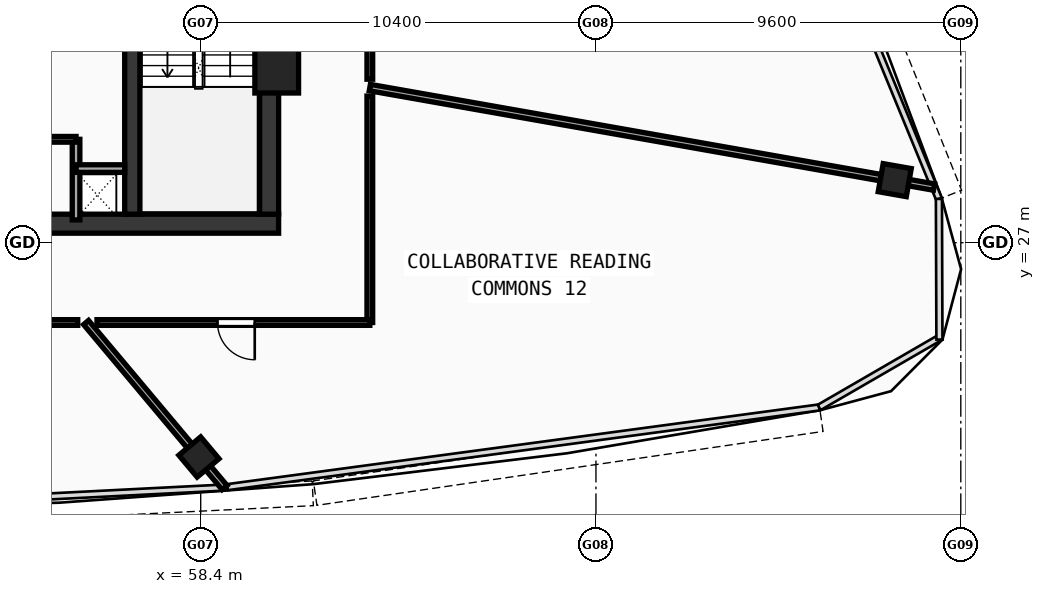
"""IFC4 building model, lengths in metres.
Left out: names, types, materials, properties, quantities, classifications, styles, units other than length and angle.
Written with IfcOpenShell. Run it as: python <this file> out.ifc"""

import sys

from ifc_helpers import new_model, si_unit, direction, frame, frame_2d, origin, origin_with_axes, origin_2d, place, context, subcontext, project, spatial, rectangle, hollow_rectangle, extrude, source, transform, mapped, element, fill, save


model = new_model("IFC4")
c1 = context("Model", 3, precision=1e-05, world=origin(), true_north=direction((0.0, 1.0)))
c2 = subcontext(c1, "Body", "Model", "MODEL_VIEW")
j1 = project(units=[si_unit("LENGTHUNIT", "METRE"), si_unit("PLANEANGLEUNIT", "RADIAN")], contexts=[c1])
p1 = place(None, origin())
s1 = spatial("IfcSite", under=j1, at=p1, CompositionType="ELEMENT")
p2 = place(p1, origin())
s2 = spatial("IfcBuilding", under=s1, at=p2, CompositionType="ELEMENT")
p3 = place(p2, frame((0.0, 0.0, 311.13)))
s3 = spatial("IfcBuildingStorey", under=s2, at=p3, CompositionType="ELEMENT", Elevation=311.13)
p4 = place(p3, frame((35.55, 27.5, 0.0), z_axis=(0.0, 0.0, 1.0), x_axis=(1.0, 0.0, 0.0)))
e1 = element("IfcWall", 1, at=p4, inside=s3, PredefinedType="SHEAR", context=c2, shape_type="SweptSolid", body=[
    extrude(rectangle(XDim=24.9, YDim=0.5, at=frame_2d((12.45, 0.0))), origin(), (0.0, 0.0, 1.0), 3.47),
])
p5 = place(p3, frame((60.2, 27.75, 0.0), z_axis=(0.0, 0.0, 1.0), x_axis=(0.0, 1.0, 0.0)))
e2 = element("IfcWall", 2, at=p5, inside=s3, PredefinedType="SHEAR", context=c2, shape_type="SweptSolid", body=[
    extrude(rectangle(XDim=12.2, YDim=0.5, at=frame_2d((6.1, 0.0))), origin(), (0.0, 0.0, 1.0), 3.47),
])
p6 = place(p3, frame((56.6, 27.75, 0.0), z_axis=(0.0, 0.0, 1.0), x_axis=(0.0, 1.0, 0.0)))
e3 = element("IfcWall", 3, at=p6, inside=s3, PredefinedType="SHEAR", context=c2, shape_type="SweptSolid", body=[
    extrude(rectangle(XDim=12.2, YDim=0.4, at=frame_2d((6.1, 0.0))), origin(), (0.0, 0.0, 1.0), 3.47),
])
p7 = place(p6, frame((10.0, 0.0, 0.0)))
e4 = element("IfcOpeningElement", 4, at=p7, cuts=e3, PredefinedType="OPENING", context=c2, shape_type="SweptSolid", body=[
    extrude(rectangle(XDim=1.1, YDim=2.1, at=frame_2d((0.55, 1.05))), frame((0.0, 0.21, 0.0), z_axis=(0.0, -1.0, 0.0), x_axis=(1.0, 0.0, 0.0)), (0.0, 0.0, 1.0), 0.42),
])
m1 = source(origin(), c2, "Body", "SweptSolid", [
    extrude(hollow_rectangle(XDim=1.15, YDim=1.15, WallThickness=0.048, at=origin_2d()), origin(), (0.0, 0.0, 1.0), 3.73),
])
p8 = place(p3, frame((60.4, 31.513, -0.26), z_axis=(0.0, 0.0, 1.0), x_axis=(1.0, 0.0, 0.0)))
e5 = element("IfcColumn", 5, at=p8, inside=s3, PredefinedType="COLUMN", context=c2, shape_type="MappedRepresentation", body=[
    mapped(m1, transform((0.0, 0.0, 0.0), scale=1.0)),
])
m2 = source(origin(), c2, "Body", "SweptSolid", [
    extrude(hollow_rectangle(XDim=0.75, YDim=0.75, WallThickness=0.028, at=origin_2d()), origin(), (0.0, 0.0, 1.0), 3.73),
])
for number, where, z_axis, x_axis in (
    (6, (58.354, 21.362, -0.26), (0.0, 0.0, 1.0), (0.766, 0.643, 0.0)),
    (7, (76.662, 28.646, -0.26), (0.0, 0.0, 1.0), (0.174, 0.985, 0.0)),
):
    element("IfcColumn", number, at=place(p3, frame(where, z_axis=z_axis, x_axis=x_axis)), inside=s3, PredefinedType="COLUMN", context=c2, shape_type="MappedRepresentation", body=[
        mapped(m2, transform((0.0, 0.0, 0.0), scale=1.0)),
    ])
p9 = place(p3, frame((55.12, 27.6, 0.0), z_axis=(0.0, 0.0, 1.0), x_axis=(0.0, 1.0, 0.0)))
e8 = element("IfcWall", 8, at=p9, inside=s3, PredefinedType="SOLIDWALL", context=c2, shape_type="SweptSolid", body=[
    extrude(rectangle(XDim=2.12, YDim=0.2, at=frame_2d((1.06, 0.0))), origin(), (0.0, 0.0, 1.0), 3.47),
])
p10 = place(p3, frame((55.12, 28.95, 0.0), z_axis=(0.0, 0.0, 1.0), x_axis=(1.0, 0.0, 0.0)))
e9 = element("IfcWall", 9, at=p10, inside=s3, PredefinedType="SOLIDWALL", context=c2, shape_type="SweptSolid", body=[
    extrude(rectangle(XDim=1.28, YDim=0.2, at=frame_2d((0.64, 0.0))), origin(), (0.0, 0.0, 1.0), 3.47),
])
p11 = place(p3, frame((51.05, 29.72, 0.0), z_axis=(0.0, 0.0, 1.0), x_axis=(1.0, 0.0, 0.0)))
e10 = element("IfcWall", 10, at=p11, inside=s3, PredefinedType="PARTITIONING", context=c2, shape_type="SweptSolid", body=[
    extrude(rectangle(XDim=4.07, YDim=0.15, at=frame_2d((2.035, 0.0))), origin(), (0.0, 0.0, 1.0), 3.47),
])
p12 = place(p11, frame((0.5, 0.0, 0.0)))
e11 = element("IfcOpeningElement", 11, at=p12, cuts=e10, PredefinedType="OPENING", context=c2, shape_type="SweptSolid", body=[
    extrude(rectangle(XDim=0.9, YDim=2.1, at=frame_2d((0.45, 1.05))), frame((0.0, 0.085, 0.0), z_axis=(0.0, -1.0, 0.0), x_axis=(1.0, 0.0, 0.0)), (0.0, 0.0, 1.0), 0.17),
])
p13 = place(p3, frame((55.384, 24.9, 0.0), z_axis=(0.0, 0.0, 1.0), x_axis=(0.642790029712, -0.76604241247, 0.0)))
e12 = element("IfcWall", 12, at=p13, inside=s3, PredefinedType="PARTITIONING", context=c2, shape_type="SweptSolid", body=[
    extrude(rectangle(XDim=5.669, YDim=0.17, at=frame_2d((2.834, 0.0))), origin(), (0.0, 0.0, 1.0), 2.87),
])
p14 = place(p3, frame((62.85, 31.082, 0.0), z_axis=(0.0, 0.0, 1.0), x_axis=(0.984808005161, -0.173646747654, 0.0)))
e13 = element("IfcWall", 13, at=p14, inside=s3, PredefinedType="PARTITIONING", context=c2, shape_type="SweptSolid", body=[
    extrude(rectangle(XDim=15.075, YDim=0.17, at=frame_2d((7.537, 0.0))), origin(), (0.0, 0.0, 1.0), 2.87),
])
p15 = place(p3, frame((62.85, 38.305, 0.0), z_axis=(0.0, 0.0, 1.0), x_axis=(0.0, -1.0, 0.0)))
e14 = element("IfcWall", 14, at=p15, inside=s3, PredefinedType="PARTITIONING", context=c2, shape_type="SweptSolid", body=[
    extrude(rectangle(XDim=7.004, YDim=0.15, at=frame_2d((3.502, 0.0))), origin(), (0.0, 0.0, 1.0), 3.47),
])
p16 = place(p15, frame((3.027, 0.0, 0.0)))
e15 = element("IfcOpeningElement", 15, at=p16, cuts=e14, PredefinedType="OPENING", context=c2, shape_type="SweptSolid", body=[
    extrude(rectangle(XDim=0.98, YDim=2.12, at=frame_2d((0.49, 1.06))), frame((0.0, 0.085, 0.0), z_axis=(0.0, -1.0, 0.0), x_axis=(1.0, 0.0, 0.0)), (0.0, 0.0, 1.0), 0.17),
])
p17 = place(p3, frame((62.85, 30.858, 0.0), z_axis=(0.0, 0.0, 1.0), x_axis=(0.0, -1.0, 0.0)))
e16 = element("IfcWall", 16, at=p17, inside=s3, PredefinedType="PARTITIONING", context=c2, shape_type="SweptSolid", body=[
    extrude(rectangle(XDim=5.958, YDim=0.15, at=frame_2d((2.979, 0.0))), origin(), (0.0, 0.0, 1.0), 3.12),
])
p18 = place(p3, frame((62.85, 24.9, 0.0), z_axis=(0.0, 0.0, 1.0), x_axis=(-1.0, 0.0, 0.0)))
e17 = element("IfcWall", 17, at=p18, inside=s3, PredefinedType="PARTITIONING", context=c2, shape_type="SweptSolid", body=[
    extrude(rectangle(XDim=7.179, YDim=0.15, at=frame_2d((3.589, 0.0))), origin(), (0.0, 0.0, 1.0), 3.12),
])
p19 = place(p18, frame((3.028, 0.0, 0.0)))
e18 = element("IfcOpeningElement", 18, at=p19, cuts=e17, PredefinedType="OPENING", context=c2, shape_type="SweptSolid", body=[
    extrude(rectangle(XDim=0.98, YDim=2.12, at=frame_2d((0.49, 1.06))), frame((0.0, 0.085, 0.0), z_axis=(0.0, -1.0, 0.0), x_axis=(1.0, 0.0, 0.0)), (0.0, 0.0, 1.0), 0.17),
])
p20 = place(p3, frame((55.164, 24.9, 0.0), z_axis=(0.0, 0.0, 1.0), x_axis=(-1.0, 0.0, 0.0)))
e19 = element("IfcWall", 19, at=p20, inside=s3, PredefinedType="PARTITIONING", context=c2, shape_type="SweptSolid", body=[
    extrude(rectangle(XDim=9.302, YDim=0.15, at=frame_2d((4.651, 0.0))), origin(), (0.0, 0.0, 1.0), 2.87),
])
p21 = place(p20, frame((4.176, 0.0, 0.0)))
e20 = element("IfcOpeningElement", 20, at=p21, cuts=e19, PredefinedType="OPENING", context=c2, shape_type="SweptSolid", body=[
    extrude(rectangle(XDim=0.98, YDim=2.12, at=frame_2d((0.49, 1.06))), frame((0.0, 0.085, 0.0), z_axis=(0.0, -1.0, 0.0), x_axis=(1.0, 0.0, 0.0)), (0.0, 0.0, 1.0), 0.17),
])
m3 = source(origin(), c2, "Body", "SweptSolid", [
    extrude(rectangle(XDim=0.98, YDim=2.12, at=frame_2d((0.49, 1.06))), frame((0.0, 0.025, 0.0), z_axis=(0.0, -1.0, 0.0), x_axis=(1.0, 0.0, 0.0)), (0.0, 0.0, 1.0), 0.05),
])
p22 = place(p19, origin_with_axes())
e21 = element("IfcDoor", 21, at=p22, inside=s3, OperationType="SINGLE_SWING_LEFT", PredefinedType="DOOR", context=c2, shape_type="MappedRepresentation", body=[
    mapped(m3, transform((0.0, 0.0, 0.0), scale=1.0)),
])
fill(e18, e21)
save(model, sys.argv[1])
